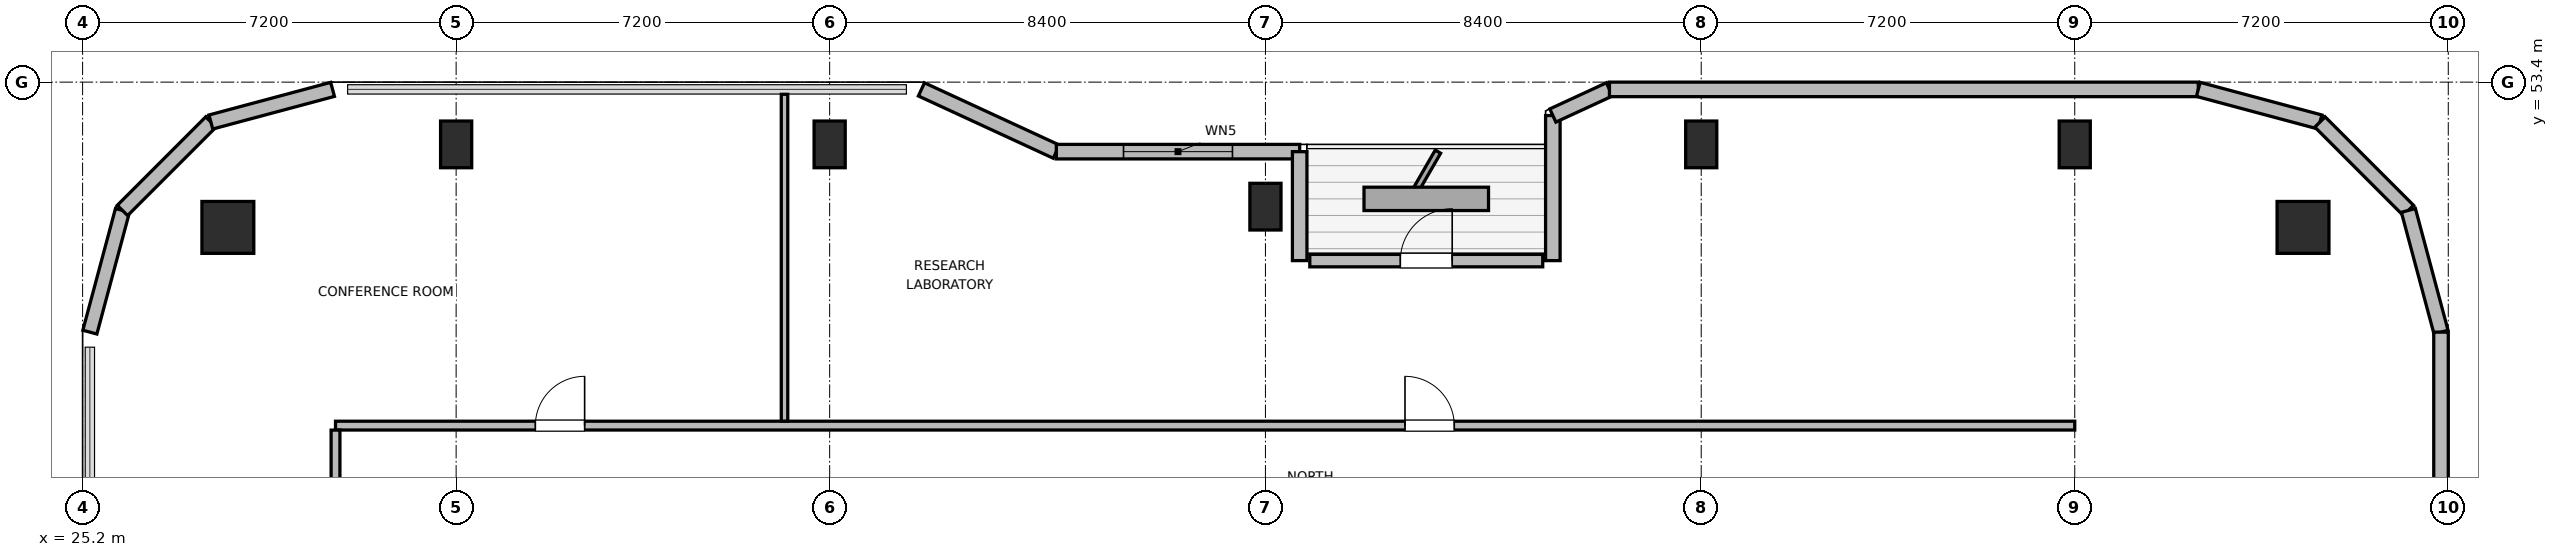
"""IFC4 building model, lengths in metres.
Left out: names, types, materials, properties, quantities, classifications, styles, units other than length and angle.
Written with IfcOpenShell. Run it as: python <this file> out.ifc"""

import sys

from ifc_helpers import new_model, si_unit, direction, frame, frame_2d, origin, origin_2d, place, context, subcontext, project, spatial, rectangle, circle, extrude, element, fill, save


model = new_model("IFC4")
c1 = context("Model", 3, precision=1e-05, world=origin(), true_north=direction((0.0, 1.0)))
c2 = subcontext(c1, "Body", "Model", "MODEL_VIEW")
j1 = project(units=[si_unit("LENGTHUNIT", "METRE"), si_unit("PLANEANGLEUNIT", "RADIAN")], contexts=[c1])
p1 = place(None, origin())
s1 = spatial("IfcSite", under=j1, at=p1, CompositionType="ELEMENT")
p2 = place(p1, origin())
s2 = spatial("IfcBuilding", under=s1, at=p2, CompositionType="ELEMENT")
p3 = place(p2, frame((0.0, 0.0, 337.5)))
s3 = spatial("IfcBuildingStorey", under=s2, at=p3, CompositionType="ELEMENT", Elevation=337.5)
for number, where, z_axis, x_axis in (
    (1, (68.0, 50.6, 0.0), (0.0, 0.0, 1.0), (1.0, 0.0, 0.0)),
    (2, (28.0, 50.6, 0.0), (0.0, 0.0, 1.0), (1.0, 0.0, 0.0)),
):
    element("IfcColumn", number, at=place(p3, frame(where, z_axis=z_axis, x_axis=x_axis)), inside=s3, PredefinedType="COLUMN", context=c2, shape_type="SweptSolid", body=[
        extrude(circle(Radius=0.5, at=origin_2d()), origin(), (0.0, 0.0, 1.0), 4.5),
    ])
for number, where, z_axis, x_axis in (
    (3, (32.4, 52.2, 0.0), (0.0, 0.0, 1.0), (1.0, 0.0, 0.0)),
    (4, (39.6, 52.2, 0.0), (0.0, 0.0, 1.0), (1.0, 0.0, 0.0)),
    (5, (48.0, 51.0, 0.0), (0.0, 0.0, 1.0), (1.0, 0.0, 0.0)),
    (6, (56.4, 52.2, 0.0), (0.0, 0.0, 1.0), (1.0, 0.0, 0.0)),
    (7, (63.6, 52.2, 0.0), (0.0, 0.0, 1.0), (1.0, 0.0, 0.0)),
):
    element("IfcColumn", number, at=place(p3, frame(where, z_axis=z_axis, x_axis=x_axis)), inside=s3, PredefinedType="COLUMN", context=c2, shape_type="SweptSolid", body=[
        extrude(rectangle(XDim=0.6, YDim=0.9, at=origin_2d()), origin(), (0.0, 0.0, 1.0), 4.5),
    ])
p4 = place(p3, frame((25.34, 48.582, 0.0), z_axis=(0.0, 0.0, 1.0), x_axis=(0.258751159445, 0.965944013639, 0.0)))
e8 = element("IfcWall", 8, at=p4, inside=s3, PredefinedType="SOLIDWALL", context=c2, shape_type="SweptSolid", body=[
    extrude(rectangle(XDim=2.429, YDim=0.28, at=frame_2d((1.214, 0.0))), origin(), (0.0, 0.0, 1.0), 4.28),
])
p5 = place(p3, frame((25.969, 50.927, 0.0), z_axis=(0.0, 0.0, 1.0), x_axis=(0.707106781187, 0.707106781187, 0.0)))
e9 = element("IfcWall", 9, at=p5, inside=s3, PredefinedType="SOLIDWALL", context=c2, shape_type="SweptSolid", body=[
    extrude(rectangle(XDim=2.41, YDim=0.28, at=frame_2d((1.205, 0.0))), origin(), (0.0, 0.0, 1.0), 4.28),
])
p6 = place(p3, frame((27.673, 52.632, 0.0), z_axis=(0.0, 0.0, 1.0), x_axis=(0.965937282298, 0.25877628691, 0.0)))
e10 = element("IfcWall", 10, at=p6, inside=s3, PredefinedType="SOLIDWALL", context=c2, shape_type="SweptSolid", body=[
    extrude(rectangle(XDim=2.428, YDim=0.28, at=frame_2d((1.214, 0.0))), origin(), (0.0, 0.0, 1.0), 4.28),
])
p7 = place(p3, frame((41.369, 53.26, 0.0), z_axis=(0.0, 0.0, 1.0), x_axis=(0.907956889006, -0.419063584324, 0.0)))
e11 = element("IfcWall", 11, at=p7, inside=s3, PredefinedType="SOLIDWALL", context=c2, shape_type="SweptSolid", body=[
    extrude(rectangle(XDim=2.864, YDim=0.28, at=frame_2d((1.432, 0.0))), origin(), (0.0, 0.0, 1.0), 2.865),
])
p8 = place(p3, frame((43.969, 52.06, 0.0), z_axis=(0.0, 0.0, 1.0), x_axis=(1.0, 0.0, 0.0)))
e12 = element("IfcWall", 12, at=p8, inside=s3, PredefinedType="SOLIDWALL", context=c2, shape_type="SweptSolid", body=[
    extrude(rectangle(XDim=4.691, YDim=0.28, at=frame_2d((2.345, 0.0))), origin(), (0.0, 0.0, 1.0), 2.865),
])
p9 = place(p8, frame((1.295, 0.0, 0.85)))
e13 = element("IfcOpeningElement", 13, at=p9, cuts=e12, PredefinedType="OPENING", context=c2, shape_type="SweptSolid", body=[
    extrude(rectangle(XDim=2.1, YDim=1.05, at=frame_2d((1.05, 0.525))), frame((0.0, 0.15, 0.0), z_axis=(0.0, -1.0, 0.0), x_axis=(1.0, 0.0, 0.0)), (0.0, 0.0, 1.0), 0.3),
])
p10 = place(p3, frame((48.66, 52.06, 0.0), z_axis=(0.0, 0.0, 1.0), x_axis=(0.0, -1.0, 0.0)))
e14 = element("IfcWall", 14, at=p10, inside=s3, PredefinedType="SOLIDWALL", context=c2, shape_type="SweptSolid", body=[
    extrude(rectangle(XDim=2.1, YDim=0.28, at=frame_2d((1.05, 0.0))), origin(), (0.0, 0.0, 1.0), 2.865),
])
p11 = place(p3, frame((48.855, 49.96, 0.0), z_axis=(0.0, 0.0, 1.0), x_axis=(1.0, 0.0, 0.0)))
e15 = element("IfcWall", 15, at=p11, inside=s3, PredefinedType="SOLIDWALL", context=c2, shape_type="SweptSolid", body=[
    extrude(rectangle(XDim=4.49, YDim=0.24, at=frame_2d((2.245, 0.0))), origin(), (0.0, 0.0, 1.0), 4.28),
])
p12 = place(p11, frame((1.745, 0.0, 0.0)))
e16 = element("IfcOpeningElement", 16, at=p12, cuts=e15, PredefinedType="OPENING", context=c2, shape_type="SweptSolid", body=[
    extrude(rectangle(XDim=1.0, YDim=2.02, at=frame_2d((0.5, 1.01))), frame((0.0, 0.13, 0.0), z_axis=(0.0, -1.0, 0.0), x_axis=(1.0, 0.0, 0.0)), (0.0, 0.0, 1.0), 0.26),
])
p13 = place(p3, frame((53.54, 49.96, 0.0), z_axis=(0.0, 0.0, 1.0), x_axis=(0.0, 1.0, 0.0)))
e17 = element("IfcWall", 17, at=p13, inside=s3, PredefinedType="SOLIDWALL", context=c2, shape_type="SweptSolid", body=[
    extrude(rectangle(XDim=2.796, YDim=0.28, at=frame_2d((1.398, 0.0))), origin(), (0.0, 0.0, 1.0), 2.865),
])
p14 = place(p3, frame((53.54, 52.756, 0.0), z_axis=(0.0, 0.0, 1.0), x_axis=(0.907893953211, 0.419199916176, 0.0)))
e18 = element("IfcWall", 18, at=p14, inside=s3, PredefinedType="SOLIDWALL", context=c2, shape_type="SweptSolid", body=[
    extrude(rectangle(XDim=1.201, YDim=0.28, at=frame_2d((0.601, 0.0))), origin(), (0.0, 0.0, 1.0), 4.28),
])
p15 = place(p3, frame((54.631, 53.26, 0.0), z_axis=(0.0, 0.0, 1.0), x_axis=(1.0, 0.0, 0.0)))
e19 = element("IfcWall", 19, at=p15, inside=s3, PredefinedType="SOLIDWALL", context=c2, shape_type="SweptSolid", body=[
    extrude(rectangle(XDim=11.351, YDim=0.28, at=frame_2d((5.675, 0.0))), origin(), (0.0, 0.0, 1.0), 4.28),
])
p16 = place(p3, frame((65.982, 53.26, 0.0), z_axis=(0.0, 0.0, 1.0), x_axis=(0.965937282298, -0.25877628691, 0.0)))
e20 = element("IfcWall", 20, at=p16, inside=s3, PredefinedType="SOLIDWALL", context=c2, shape_type="SweptSolid", body=[
    extrude(rectangle(XDim=2.428, YDim=0.28, at=frame_2d((1.214, 0.0))), origin(), (0.0, 0.0, 1.0), 4.28),
])
p17 = place(p3, frame((68.327, 52.632, 0.0), z_axis=(0.0, 0.0, 1.0), x_axis=(0.707106781187, -0.707106781187, 0.0)))
e21 = element("IfcWall", 21, at=p17, inside=s3, PredefinedType="SOLIDWALL", context=c2, shape_type="SweptSolid", body=[
    extrude(rectangle(XDim=2.41, YDim=0.28, at=frame_2d((1.205, 0.0))), origin(), (0.0, 0.0, 1.0), 4.28),
])
p18 = place(p3, frame((70.031, 50.927, 0.0), z_axis=(0.0, 0.0, 1.0), x_axis=(0.258751159445, -0.965944013639, 0.0)))
e22 = element("IfcWall", 22, at=p18, inside=s3, PredefinedType="SOLIDWALL", context=c2, shape_type="SweptSolid", body=[
    extrude(rectangle(XDim=2.429, YDim=0.28, at=frame_2d((1.214, 0.0))), origin(), (0.0, 0.0, 1.0), 4.28),
])
p19 = place(p3, frame((70.66, 48.582, 0.0), z_axis=(0.0, 0.0, 1.0), x_axis=(0.0, -1.0, 0.0)))
e23 = element("IfcWall", 23, at=p19, inside=s3, PredefinedType="SOLIDWALL", context=c2, shape_type="SweptSolid", body=[
    extrude(rectangle(XDim=5.842, YDim=0.28, at=frame_2d((2.921, 0.0))), origin(), (0.0, 0.0, 1.0), 4.28),
])
p20 = place(p3, frame((30.075, 46.78, 0.0), z_axis=(0.0, 0.0, 1.0), x_axis=(1.0, 0.0, 0.0)))
e24 = element("IfcWall", 24, at=p20, inside=s3, PredefinedType="PARTITIONING", context=c2, shape_type="SweptSolid", body=[
    extrude(rectangle(XDim=33.525, YDim=0.17, at=frame_2d((16.763, 0.0))), origin(), (0.0, 0.0, 1.0), 4.28),
])
p21 = place(p20, frame((3.852, 0.0, 0.0)))
e25 = element("IfcOpeningElement", 25, at=p21, cuts=e24, PredefinedType="OPENING", context=c2, shape_type="SweptSolid", body=[
    extrude(rectangle(XDim=0.95, YDim=2.04, at=frame_2d((0.475, 1.02))), frame((0.0, 0.095, 0.0), z_axis=(0.0, -1.0, 0.0), x_axis=(1.0, 0.0, 0.0)), (0.0, 0.0, 1.0), 0.19),
])
p22 = place(p20, frame((20.615, 0.0, 0.0)))
e26 = element("IfcOpeningElement", 26, at=p22, cuts=e24, PredefinedType="OPENING", context=c2, shape_type="SweptSolid", body=[
    extrude(rectangle(XDim=0.95, YDim=2.04, at=frame_2d((0.475, 1.02))), frame((0.0, 0.095, 0.0), z_axis=(0.0, -1.0, 0.0), x_axis=(1.0, 0.0, 0.0)), (0.0, 0.0, 1.0), 0.19),
])
p23 = place(p3, frame((30.075, 25.307, 0.0), z_axis=(0.0, 0.0, 1.0), x_axis=(0.0, 1.0, 0.0)))
e27 = element("IfcWall", 27, at=p23, inside=s3, PredefinedType="PARTITIONING", context=c2, shape_type="SweptSolid", body=[
    extrude(rectangle(XDim=21.386, YDim=0.17, at=frame_2d((10.693, 0.0))), origin(), (0.0, 0.0, 1.0), 4.28),
])
p24 = place(p23, frame((4.428, 0.0, 0.0)))
e28 = element("IfcOpeningElement", 28, at=p24, cuts=e27, PredefinedType="OPENING", context=c2, shape_type="SweptSolid", body=[
    extrude(rectangle(XDim=0.95, YDim=2.04, at=frame_2d((0.475, 1.02))), frame((0.0, 0.095, 0.0), z_axis=(0.0, -1.0, 0.0), x_axis=(1.0, 0.0, 0.0)), (0.0, 0.0, 1.0), 0.19),
])
p25 = place(p23, frame((15.208, 0.0, 0.0)))
e29 = element("IfcOpeningElement", 29, at=p25, cuts=e27, PredefinedType="OPENING", context=c2, shape_type="SweptSolid", body=[
    extrude(rectangle(XDim=0.95, YDim=2.04, at=frame_2d((0.475, 1.02))), frame((0.0, 0.095, 0.0), z_axis=(0.0, -1.0, 0.0), x_axis=(1.0, 0.0, 0.0)), (0.0, 0.0, 1.0), 0.19),
])
p26 = place(p3, frame((38.73, 46.867, 0.0), z_axis=(0.0, 0.0, 1.0), x_axis=(0.0, 1.0, 0.0)))
e30 = element("IfcWall", 30, at=p26, inside=s3, PredefinedType="PARTITIONING", context=c2, shape_type="SweptSolid", body=[
    extrude(rectangle(XDim=6.298, YDim=0.125, at=frame_2d((3.149, 0.0))), origin(), (0.0, 0.0, 1.0), 4.28),
])
p27 = place(p9, origin())
e31 = element("IfcWindow", 31, at=p27, inside=s3, PartitioningType="SINGLE_PANEL", PredefinedType="WINDOW", context=c2, shape_type="SweptSolid", body=[
    extrude(rectangle(XDim=2.1, YDim=1.05, at=frame_2d((1.05, 0.525))), frame((0.0, 0.03, 0.0), z_axis=(0.0, -1.0, 0.0), x_axis=(1.0, 0.0, 0.0)), (0.0, 0.0, 1.0), 0.06),
])
fill(e13, e31)
p28 = place(p12, origin())
e32 = element("IfcDoor", 32, at=p28, inside=s3, OperationType="SINGLE_SWING_RIGHT", PredefinedType="DOOR", context=c2, shape_type="SweptSolid", body=[
    extrude(rectangle(XDim=1.0, YDim=2.02, at=frame_2d((0.5, 1.01))), frame((0.0, 0.025, 0.0), z_axis=(0.0, -1.0, 0.0), x_axis=(1.0, 0.0, 0.0)), (0.0, 0.0, 1.0), 0.05),
])
fill(e16, e32)
p29 = place(p21, origin())
e33 = element("IfcDoor", 33, at=p29, inside=s3, OperationType="SINGLE_SWING_RIGHT", PredefinedType="DOOR", context=c2, shape_type="SweptSolid", body=[
    extrude(rectangle(XDim=0.95, YDim=2.04, at=frame_2d((0.475, 1.02))), frame((0.0, 0.025, 0.0), z_axis=(0.0, -1.0, 0.0), x_axis=(1.0, 0.0, 0.0)), (0.0, 0.0, 1.0), 0.05),
])
fill(e25, e33)
p30 = place(p22, origin())
e34 = element("IfcDoor", 34, at=p30, inside=s3, OperationType="SINGLE_SWING_LEFT", PredefinedType="DOOR", context=c2, shape_type="SweptSolid", body=[
    extrude(rectangle(XDim=0.95, YDim=2.04, at=frame_2d((0.475, 1.02))), frame((0.0, 0.025, 0.0), z_axis=(0.0, -1.0, 0.0), x_axis=(1.0, 0.0, 0.0)), (0.0, 0.0, 1.0), 0.05),
])
fill(e26, e34)
save(model, sys.argv[1])
